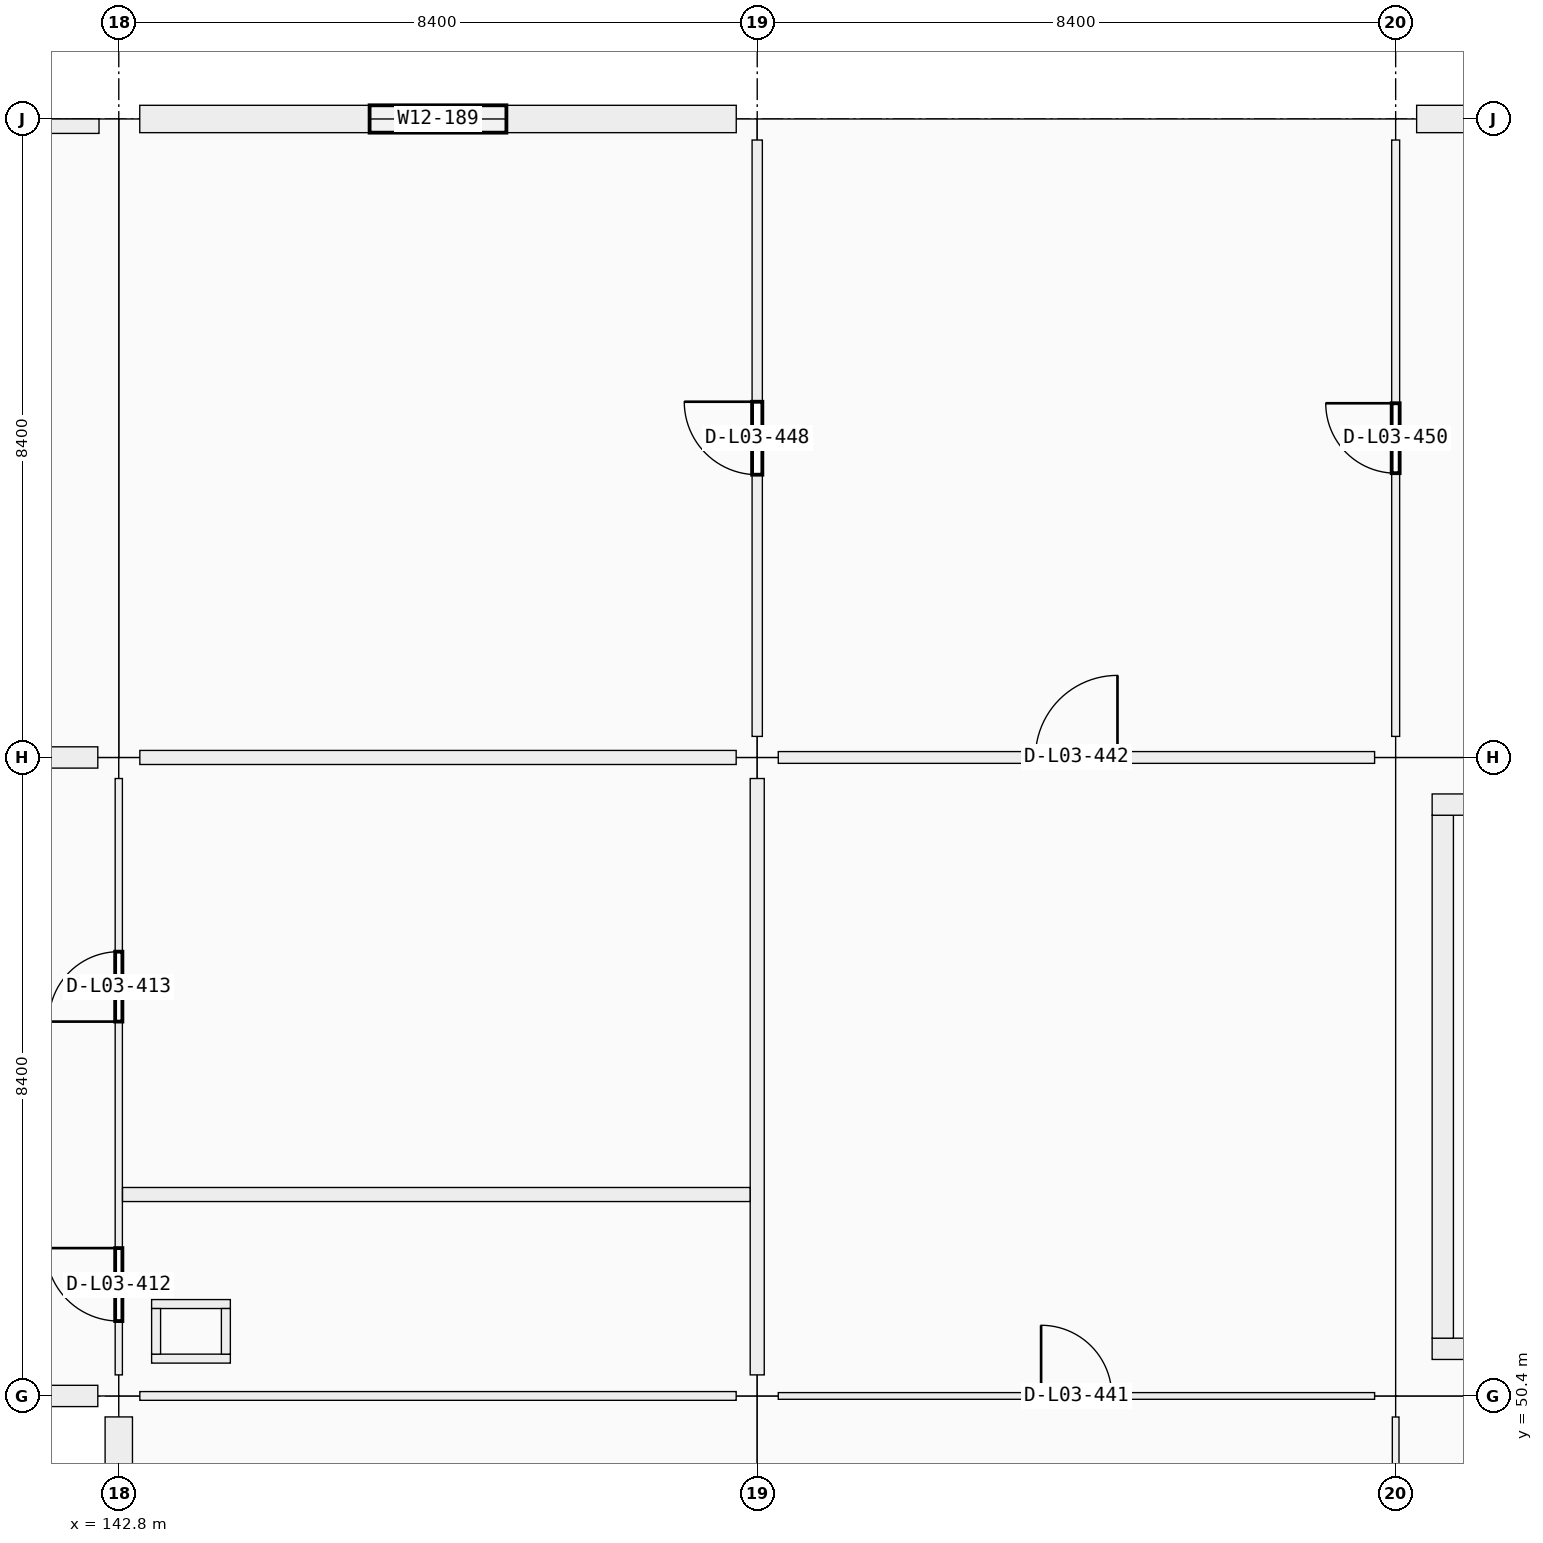
"""IFC4 building model, lengths in metres.
Left out: names, types, materials, properties, quantities, classifications, styles, units other than length and angle.
Written with IfcOpenShell. Run it as: python <this file> out.ifc"""

import sys

from ifc_helpers import new_model, si_unit, direction, frame, frame_2d, origin, origin_2d, place, context, subcontext, project, spatial, rectangle, i_section, extrude, element, fill, save


model = new_model("IFC4")
c1 = context("Model", 3, precision=1e-05, world=origin(), true_north=direction((0.0, 1.0)))
c2 = subcontext(c1, "Body", "Model", "MODEL_VIEW")
j1 = project(units=[si_unit("LENGTHUNIT", "METRE"), si_unit("PLANEANGLEUNIT", "RADIAN")], contexts=[c1])
p1 = place(None, origin())
s1 = spatial("IfcSite", under=j1, at=p1, CompositionType="ELEMENT")
p2 = place(p1, origin())
s2 = spatial("IfcBuilding", under=s1, at=p2, CompositionType="ELEMENT")
p3 = place(p2, frame((0.0, 0.0, 14.76)))
s3 = spatial("IfcBuildingStorey", under=s2, at=p3, CompositionType="ELEMENT", Elevation=14.76)
for number, where, z_axis, x_axis in (
    (1, (142.8, 50.4, 0.0), (0.0, 0.0, 1.0), (1.0, 0.0, 0.0)),
    (2, (142.8, 58.8, 0.0), (0.0, 0.0, 1.0), (1.0, 0.0, 0.0)),
    (3, (142.8, 67.2, 0.0), (0.0, 0.0, 1.0), (1.0, 0.0, 0.0)),
    (4, (151.2, 50.4, 0.0), (0.0, 0.0, 1.0), (1.0, 0.0, 0.0)),
    (5, (151.2, 58.8, 0.0), (0.0, 0.0, 1.0), (1.0, 0.0, 0.0)),
    (6, (151.2, 67.2, 0.0), (0.0, 0.0, 1.0), (1.0, 0.0, 0.0)),
    (7, (159.6, 50.4, 0.0), (0.0, 0.0, 1.0), (1.0, 0.0, 0.0)),
    (8, (159.6, 58.8, 0.0), (0.0, 0.0, 1.0), (1.0, 0.0, 0.0)),
    (9, (159.6, 67.2, 0.0), (0.0, 0.0, 1.0), (1.0, 0.0, 0.0)),
):
    element("IfcColumn", number, at=place(p3, frame(where, z_axis=z_axis, x_axis=x_axis)), inside=s3, PredefinedType="COLUMN", context=c2, shape_type="SweptSolid", body=[
        extrude(rectangle(XDim=0.55, YDim=0.55, at=origin_2d()), origin(), (0.0, 0.0, 1.0), 4.17),
    ])
for number, where, z_axis, x_axis in (
    (10, (142.94, 50.4, 4.17), (0.0, 0.0, 1.0), (1.0, 0.0, 0.0)),
    (11, (151.2, 50.4, 4.17), (0.0, 0.0, 1.0), (1.0, 0.0, 0.0)),
    (12, (159.6, 50.4, 4.17), (0.0, 0.0, 1.0), (1.0, 0.0, 0.0)),
    (13, (142.94, 58.8, 4.17), (0.0, 0.0, 1.0), (1.0, 0.0, 0.0)),
    (14, (151.2, 58.8, 4.17), (0.0, 0.0, 1.0), (1.0, 0.0, 0.0)),
    (15, (159.6, 58.8, 4.17), (0.0, 0.0, 1.0), (1.0, 0.0, 0.0)),
):
    element("IfcColumn", number, at=place(p3, frame(where, z_axis=z_axis, x_axis=x_axis)), inside=s3, PredefinedType="COLUMN", context=c2, shape_type="SweptSolid", body=[
        extrude(i_section(OverallWidth=0.254, OverallDepth=0.254, WebThickness=0.009, FlangeThickness=0.014, FilletRadius=0.013, at=origin_2d()), origin(), (0.0, 0.0, 1.0), 2.157),
    ])
p4 = place(p3, frame((142.524, 50.4, 0.0), z_axis=(0.0, 0.0, 1.0), x_axis=(-1.0, 0.0, 0.0)))
e16 = element("IfcWall", 16, at=p4, inside=s3, PredefinedType="SOLIDWALL", context=c2, shape_type="SweptSolid", body=[
    extrude(rectangle(XDim=7.848, YDim=0.28, at=frame_2d((3.924, 0.0))), origin(), (0.0, 0.0, 1.0), 3.37),
])
p5 = place(p4, frame((3.124, 0.0, 0.9)))
e17 = element("IfcOpeningElement", 17, at=p5, cuts=e16, PredefinedType="OPENING", context=c2, shape_type="SweptSolid", body=[
    extrude(rectangle(XDim=1.6, YDim=2.1, at=frame_2d((0.8, 1.05))), frame((0.0, 0.14, 0.0), z_axis=(0.0, -1.0, 0.0), x_axis=(1.0, 0.0, 0.0)), (0.0, 0.0, 1.0), 0.28),
])
p6 = place(p3, frame((134.676, 58.8, 0.0), z_axis=(0.0, 0.0, 1.0), x_axis=(1.0, 0.0, 0.0)))
e18 = element("IfcWall", 18, at=p6, inside=s3, PredefinedType="SOLIDWALL", context=c2, shape_type="SweptSolid", body=[
    extrude(rectangle(XDim=7.848, YDim=0.28, at=frame_2d((3.924, 0.0))), origin(), (0.0, 0.0, 1.0), 3.37),
])
p7 = place(p6, frame((2.924, 0.0, 0.9)))
e19 = element("IfcOpeningElement", 19, at=p7, cuts=e18, PredefinedType="OPENING", context=c2, shape_type="SweptSolid", body=[
    extrude(rectangle(XDim=2.0, YDim=2.1, at=frame_2d((1.0, 1.05))), frame((0.0, 0.14, 0.0), z_axis=(0.0, -1.0, 0.0), x_axis=(1.0, 0.0, 0.0)), (0.0, 0.0, 1.0), 0.28),
])
p8 = place(p3, frame((142.8, 42.276, 0.0), z_axis=(0.0, 0.0, 1.0), x_axis=(0.0, 1.0, 0.0)))
e20 = element("IfcWall", 20, at=p8, inside=s3, PredefinedType="SOLIDWALL", context=c2, shape_type="SweptSolid", body=[
    extrude(rectangle(XDim=7.848, YDim=0.36, at=frame_2d((3.924, 0.0))), origin(), (0.0, 0.0, 1.0), 3.37),
])
p9 = place(p8, frame((2.824, 0.0, 0.9)))
e21 = element("IfcOpeningElement", 21, at=p9, cuts=e20, PredefinedType="OPENING", context=c2, shape_type="SweptSolid", body=[
    extrude(rectangle(XDim=2.2, YDim=1.35, at=frame_2d((1.1, 0.675))), frame((0.0, 0.18, 0.0), z_axis=(0.0, -1.0, 0.0), x_axis=(1.0, 0.0, 0.0)), (0.0, 0.0, 1.0), 0.36),
])
p10 = place(p3, frame((143.076, 67.2, 0.0), z_axis=(0.0, 0.0, 1.0), x_axis=(1.0, 0.0, 0.0)))
e22 = element("IfcWall", 22, at=p10, inside=s3, PredefinedType="SOLIDWALL", context=c2, shape_type="SweptSolid", body=[
    extrude(rectangle(XDim=7.848, YDim=0.36, at=frame_2d((3.924, 0.0))), origin(), (0.0, 0.0, 1.0), 3.37),
])
p11 = place(p10, frame((3.024, 0.0, 0.9)))
e23 = element("IfcOpeningElement", 23, at=p11, cuts=e22, PredefinedType="OPENING", context=c2, shape_type="SweptSolid", body=[
    extrude(rectangle(XDim=1.8, YDim=1.35, at=frame_2d((0.9, 0.675))), frame((0.0, 0.18, 0.0), z_axis=(0.0, -1.0, 0.0), x_axis=(1.0, 0.0, 0.0)), (0.0, 0.0, 1.0), 0.36),
])
p12 = place(p3, frame((159.876, 67.2, 0.0), z_axis=(0.0, 0.0, 1.0), x_axis=(1.0, 0.0, 0.0)))
e24 = element("IfcWall", 24, at=p12, inside=s3, PredefinedType="SOLIDWALL", context=c2, shape_type="SweptSolid", body=[
    extrude(rectangle(XDim=7.848, YDim=0.36, at=frame_2d((3.924, 0.0))), origin(), (0.0, 0.0, 1.0), 3.37),
])
p13 = place(p12, frame((3.224, 0.0, 0.9)))
e25 = element("IfcOpeningElement", 25, at=p13, cuts=e24, PredefinedType="OPENING", context=c2, shape_type="SweptSolid", body=[
    extrude(rectangle(XDim=1.4, YDim=1.75, at=frame_2d((0.7, 0.875))), frame((0.0, 0.18, 0.0), z_axis=(0.0, -1.0, 0.0), x_axis=(1.0, 0.0, 0.0)), (0.0, 0.0, 1.0), 0.36),
])
p14 = place(p3, frame((134.66, 67.105, 0.0), z_axis=(0.0, 0.0, 1.0), x_axis=(1.0, 0.0, 0.0)))
e26 = element("IfcWall", 26, at=p14, inside=s3, PredefinedType="PARAPET", context=c2, shape_type="SweptSolid", body=[
    extrude(rectangle(XDim=7.88, YDim=0.19, at=frame_2d((3.94, 0.0))), origin(), (0.0, 0.0, 1.0), 0.95),
])
p15 = place(p3, frame((167.52, 51.02, 0.0), z_axis=(0.0, 0.0, 1.0), x_axis=(-1.0, 0.0, 0.0)))
e27 = element("IfcWall", 27, at=p15, inside=s3, PredefinedType="SHEAR", context=c2, shape_type="SweptSolid", body=[
    extrude(rectangle(XDim=7.44, YDim=0.28, at=frame_2d((3.72, 0.0))), origin(), (0.0, 0.0, 1.0), 4.07),
])
p16 = place(p15, frame((1.28, 0.0, 0.0)))
e28 = element("IfcOpeningElement", 28, at=p16, cuts=e27, PredefinedType="OPENING", context=c2, shape_type="SweptSolid", body=[
    extrude(rectangle(XDim=1.5, YDim=2.15, at=frame_2d((0.75, 1.075))), frame((0.0, 0.14, 0.0), z_axis=(0.0, -1.0, 0.0), x_axis=(1.0, 0.0, 0.0)), (0.0, 0.0, 1.0), 0.28),
])
p17 = place(p3, frame((160.22, 51.16, 0.0), z_axis=(0.0, 0.0, 1.0), x_axis=(0.0, 1.0, 0.0)))
e29 = element("IfcWall", 29, at=p17, inside=s3, PredefinedType="SHEAR", context=c2, shape_type="SweptSolid", body=[
    extrude(rectangle(XDim=6.88, YDim=0.28, at=frame_2d((3.44, 0.0))), origin(), (0.0, 0.0, 1.0), 4.07),
])
p18 = place(p3, frame((160.08, 58.18, 0.0), z_axis=(0.0, 0.0, 1.0), x_axis=(1.0, 0.0, 0.0)))
e30 = element("IfcWall", 30, at=p18, inside=s3, PredefinedType="SHEAR", context=c2, shape_type="SweptSolid", body=[
    extrude(rectangle(XDim=7.44, YDim=0.28, at=frame_2d((3.72, 0.0))), origin(), (0.0, 0.0, 1.0), 4.07),
])
for number, where, z_axis, x_axis in (
    (31, (143.232, 50.891, 0.0), (0.0, 0.0, 1.0), (1.0, 0.0, 0.0)),
    (32, (143.232, 51.609, 0.0), (0.0, 0.0, 1.0), (1.0, 0.0, 0.0)),
):
    element("IfcWall", number, at=place(p3, frame(where, z_axis=z_axis, x_axis=x_axis)), inside=s3, PredefinedType="PARTITIONING", context=c2, shape_type="SweptSolid", body=[
        extrude(rectangle(XDim=1.036, YDim=0.118, at=frame_2d((0.518, 0.0))), origin(), (0.0, 0.0, 1.0), 3.35),
    ])
for number, where, z_axis, x_axis in (
    (33, (143.291, 50.95, 0.0), (0.0, 0.0, 1.0), (0.0, 1.0, 0.0)),
    (34, (144.209, 50.95, 0.0), (0.0, 0.0, 1.0), (0.0, 1.0, 0.0)),
):
    element("IfcWall", number, at=place(p3, frame(where, z_axis=z_axis, x_axis=x_axis)), inside=s3, PredefinedType="PARTITIONING", context=c2, shape_type="SweptSolid", body=[
        extrude(rectangle(XDim=0.6, YDim=0.118, at=frame_2d((0.3, 0.0))), origin(), (0.0, 0.0, 1.0), 3.35),
    ])
p19 = place(p3, frame((143.077, 50.4, 0.0), z_axis=(0.0, 0.0, 1.0), x_axis=(1.0, 0.0, 0.0)))
e35 = element("IfcWall", 35, at=p19, inside=s3, PredefinedType="PARTITIONING", context=c2, shape_type="SweptSolid", body=[
    extrude(rectangle(XDim=7.846, YDim=0.115, at=frame_2d((3.923, 0.0))), origin(), (0.0, 0.0, 1.0), 3.19),
])
p20 = place(p3, frame((143.077, 58.8, 0.0), z_axis=(0.0, 0.0, 1.0), x_axis=(1.0, 0.0, 0.0)))
e36 = element("IfcWall", 36, at=p20, inside=s3, PredefinedType="PARTITIONING", context=c2, shape_type="SweptSolid", body=[
    extrude(rectangle(XDim=7.846, YDim=0.185, at=frame_2d((3.923, 0.0))), origin(), (0.0, 0.0, 1.0), 3.19),
])
p21 = place(p3, frame((151.477, 50.4, 0.0), z_axis=(0.0, 0.0, 1.0), x_axis=(1.0, 0.0, 0.0)))
e37 = element("IfcWall", 37, at=p21, inside=s3, PredefinedType="PARTITIONING", context=c2, shape_type="SweptSolid", body=[
    extrude(rectangle(XDim=7.846, YDim=0.088, at=frame_2d((3.923, 0.0))), origin(), (0.0, 0.0, 1.0), 3.19),
])
p22 = place(p21, frame((3.458, 0.0, 0.0)))
e38 = element("IfcOpeningElement", 38, at=p22, cuts=e37, PredefinedType="OPENING", context=c2, shape_type="SweptSolid", body=[
    extrude(rectangle(XDim=0.93, YDim=2.12, at=frame_2d((0.465, 1.06))), frame((0.0, 0.044, 0.0), z_axis=(0.0, -1.0, 0.0), x_axis=(1.0, 0.0, 0.0)), (0.0, 0.0, 1.0), 0.088),
])
p23 = place(p3, frame((151.477, 58.8, 0.0), z_axis=(0.0, 0.0, 1.0), x_axis=(1.0, 0.0, 0.0)))
e39 = element("IfcWall", 39, at=p23, inside=s3, PredefinedType="PARTITIONING", context=c2, shape_type="SweptSolid", body=[
    extrude(rectangle(XDim=7.846, YDim=0.155, at=frame_2d((3.923, 0.0))), origin(), (0.0, 0.0, 1.0), 3.19),
])
p24 = place(p23, frame((3.383, 0.0, 0.0)))
e40 = element("IfcOpeningElement", 40, at=p24, cuts=e39, PredefinedType="OPENING", context=c2, shape_type="SweptSolid", body=[
    extrude(rectangle(XDim=1.08, YDim=2.25, at=frame_2d((0.54, 1.125))), frame((0.0, 0.078, 0.0), z_axis=(0.0, -1.0, 0.0), x_axis=(1.0, 0.0, 0.0)), (0.0, 0.0, 1.0), 0.155),
])
p25 = place(p3, frame((142.8, 50.677, 0.0), z_axis=(0.0, 0.0, 1.0), x_axis=(0.0, 1.0, 0.0)))
e41 = element("IfcWall", 41, at=p25, inside=s3, PredefinedType="PARTITIONING", context=c2, shape_type="SweptSolid", body=[
    extrude(rectangle(XDim=7.846, YDim=0.095, at=frame_2d((3.923, 0.0))), origin(), (0.0, 0.0, 1.0), 3.19),
])
p26 = place(p25, frame((0.708, 0.0, 0.0)))
e42 = element("IfcOpeningElement", 42, at=p26, cuts=e41, PredefinedType="OPENING", context=c2, shape_type="SweptSolid", body=[
    extrude(rectangle(XDim=0.96, YDim=2.1, at=frame_2d((0.48, 1.05))), frame((0.0, 0.047, 0.0), z_axis=(0.0, -1.0, 0.0), x_axis=(1.0, 0.0, 0.0)), (0.0, 0.0, 1.0), 0.095),
])
p27 = place(p25, frame((4.648, 0.0, 0.0)))
e43 = element("IfcOpeningElement", 43, at=p27, cuts=e41, PredefinedType="OPENING", context=c2, shape_type="SweptSolid", body=[
    extrude(rectangle(XDim=0.92, YDim=2.1, at=frame_2d((0.46, 1.05))), frame((0.0, 0.047, 0.0), z_axis=(0.0, -1.0, 0.0), x_axis=(1.0, 0.0, 0.0)), (0.0, 0.0, 1.0), 0.095),
])
p28 = place(p3, frame((151.2, 50.677, 0.0), z_axis=(0.0, 0.0, 1.0), x_axis=(0.0, 1.0, 0.0)))
e44 = element("IfcWall", 44, at=p28, inside=s3, PredefinedType="PARTITIONING", context=c2, shape_type="SweptSolid", body=[
    extrude(rectangle(XDim=7.846, YDim=0.185, at=frame_2d((3.923, 0.0))), origin(), (0.0, 0.0, 1.0), 3.19),
])
p29 = place(p3, frame((151.2, 59.077, 0.0), z_axis=(0.0, 0.0, 1.0), x_axis=(0.0, 1.0, 0.0)))
e45 = element("IfcWall", 45, at=p29, inside=s3, PredefinedType="PARTITIONING", context=c2, shape_type="SweptSolid", body=[
    extrude(rectangle(XDim=7.846, YDim=0.135, at=frame_2d((3.923, 0.0))), origin(), (0.0, 0.0, 1.0), 3.19),
])
p30 = place(p29, frame((3.443, 0.0, 0.0)))
e46 = element("IfcOpeningElement", 46, at=p30, cuts=e45, PredefinedType="OPENING", context=c2, shape_type="SweptSolid", body=[
    extrude(rectangle(XDim=0.96, YDim=2.18, at=frame_2d((0.48, 1.09))), frame((0.0, 0.067, 0.0), z_axis=(0.0, -1.0, 0.0), x_axis=(1.0, 0.0, 0.0)), (0.0, 0.0, 1.0), 0.135),
])
p31 = place(p3, frame((159.6, 42.277, 0.0), z_axis=(0.0, 0.0, 1.0), x_axis=(0.0, 1.0, 0.0)))
e47 = element("IfcWall", 47, at=p31, inside=s3, PredefinedType="PARTITIONING", context=c2, shape_type="SweptSolid", body=[
    extrude(rectangle(XDim=7.846, YDim=0.088, at=frame_2d((3.923, 0.0))), origin(), (0.0, 0.0, 1.0), 3.19),
])
p32 = place(p31, frame((3.463, 0.0, 0.0)))
e48 = element("IfcOpeningElement", 48, at=p32, cuts=e47, PredefinedType="OPENING", context=c2, shape_type="SweptSolid", body=[
    extrude(rectangle(XDim=0.92, YDim=2.15, at=frame_2d((0.46, 1.075))), frame((0.0, 0.044, 0.0), z_axis=(0.0, -1.0, 0.0), x_axis=(1.0, 0.0, 0.0)), (0.0, 0.0, 1.0), 0.088),
])
p33 = place(p3, frame((159.6, 59.077, 0.0), z_axis=(0.0, 0.0, 1.0), x_axis=(0.0, 1.0, 0.0)))
e49 = element("IfcWall", 49, at=p33, inside=s3, PredefinedType="PARTITIONING", context=c2, shape_type="SweptSolid", body=[
    extrude(rectangle(XDim=7.846, YDim=0.105, at=frame_2d((3.923, 0.0))), origin(), (0.0, 0.0, 1.0), 3.19),
])
p34 = place(p33, frame((3.463, 0.0, 0.0)))
e50 = element("IfcOpeningElement", 50, at=p34, cuts=e49, PredefinedType="OPENING", context=c2, shape_type="SweptSolid", body=[
    extrude(rectangle(XDim=0.92, YDim=2.15, at=frame_2d((0.46, 1.075))), frame((0.0, 0.052, 0.0), z_axis=(0.0, -1.0, 0.0), x_axis=(1.0, 0.0, 0.0)), (0.0, 0.0, 1.0), 0.105),
])
p35 = place(p3, frame((142.85, 53.05, 0.0), z_axis=(0.0, 0.0, 1.0), x_axis=(1.0, 0.0, 0.0)))
e51 = element("IfcWall", 51, at=p35, inside=s3, PredefinedType="PARTITIONING", context=c2, shape_type="SweptSolid", body=[
    extrude(rectangle(XDim=8.256, YDim=0.185, at=frame_2d((4.128, 0.0))), origin(), (0.0, 0.0, 1.0), 3.19),
])
p36 = place(p11, origin())
e52 = element("IfcWindow", 52, at=p36, inside=s3, PartitioningType="SINGLE_PANEL", PredefinedType="WINDOW", context=c2, shape_type="SweptSolid", body=[
    extrude(rectangle(XDim=1.8, YDim=1.35, at=frame_2d((0.9, 0.675))), frame((0.0, 0.03, 0.0), z_axis=(0.0, -1.0, 0.0), x_axis=(1.0, 0.0, 0.0)), (0.0, 0.0, 1.0), 0.06),
])
fill(e23, e52)
p37 = place(p26, origin())
e53 = element("IfcDoor", 53, at=p37, inside=s3, OperationType="SINGLE_SWING_RIGHT", PredefinedType="DOOR", context=c2, shape_type="SweptSolid", body=[
    extrude(rectangle(XDim=0.96, YDim=2.1, at=frame_2d((0.48, 1.05))), frame((0.0, 0.025, 0.0), z_axis=(0.0, -1.0, 0.0), x_axis=(1.0, 0.0, 0.0)), (0.0, 0.0, 1.0), 0.05),
])
fill(e42, e53)
p38 = place(p27, origin())
e54 = element("IfcDoor", 54, at=p38, inside=s3, OperationType="SINGLE_SWING_LEFT", PredefinedType="DOOR", context=c2, shape_type="SweptSolid", body=[
    extrude(rectangle(XDim=0.92, YDim=2.1, at=frame_2d((0.46, 1.05))), frame((0.0, 0.025, 0.0), z_axis=(0.0, -1.0, 0.0), x_axis=(1.0, 0.0, 0.0)), (0.0, 0.0, 1.0), 0.05),
])
fill(e43, e54)
p39 = place(p22, origin())
e55 = element("IfcDoor", 55, at=p39, inside=s3, OperationType="SINGLE_SWING_LEFT", PredefinedType="DOOR", context=c2, shape_type="SweptSolid", body=[
    extrude(rectangle(XDim=0.93, YDim=2.12, at=frame_2d((0.465, 1.06))), frame((0.0, 0.025, 0.0), z_axis=(0.0, -1.0, 0.0), x_axis=(1.0, 0.0, 0.0)), (0.0, 0.0, 1.0), 0.05),
])
fill(e38, e55)
p40 = place(p24, origin())
e56 = element("IfcDoor", 56, at=p40, inside=s3, OperationType="SINGLE_SWING_RIGHT", PredefinedType="DOOR", context=c2, shape_type="SweptSolid", body=[
    extrude(rectangle(XDim=1.08, YDim=2.25, at=frame_2d((0.54, 1.125))), frame((0.0, 0.025, 0.0), z_axis=(0.0, -1.0, 0.0), x_axis=(1.0, 0.0, 0.0)), (0.0, 0.0, 1.0), 0.05),
])
fill(e40, e56)
p41 = place(p30, origin())
e57 = element("IfcDoor", 57, at=p41, inside=s3, OperationType="SINGLE_SWING_RIGHT", PredefinedType="DOOR", context=c2, shape_type="SweptSolid", body=[
    extrude(rectangle(XDim=0.96, YDim=2.18, at=frame_2d((0.48, 1.09))), frame((0.0, 0.025, 0.0), z_axis=(0.0, -1.0, 0.0), x_axis=(1.0, 0.0, 0.0)), (0.0, 0.0, 1.0), 0.05),
])
fill(e46, e57)
p42 = place(p34, origin())
e58 = element("IfcDoor", 58, at=p42, inside=s3, OperationType="SINGLE_SWING_RIGHT", PredefinedType="DOOR", context=c2, shape_type="SweptSolid", body=[
    extrude(rectangle(XDim=0.92, YDim=2.15, at=frame_2d((0.46, 1.075))), frame((0.0, 0.025, 0.0), z_axis=(0.0, -1.0, 0.0), x_axis=(1.0, 0.0, 0.0)), (0.0, 0.0, 1.0), 0.05),
])
fill(e50, e58)
save(model, sys.argv[1])
